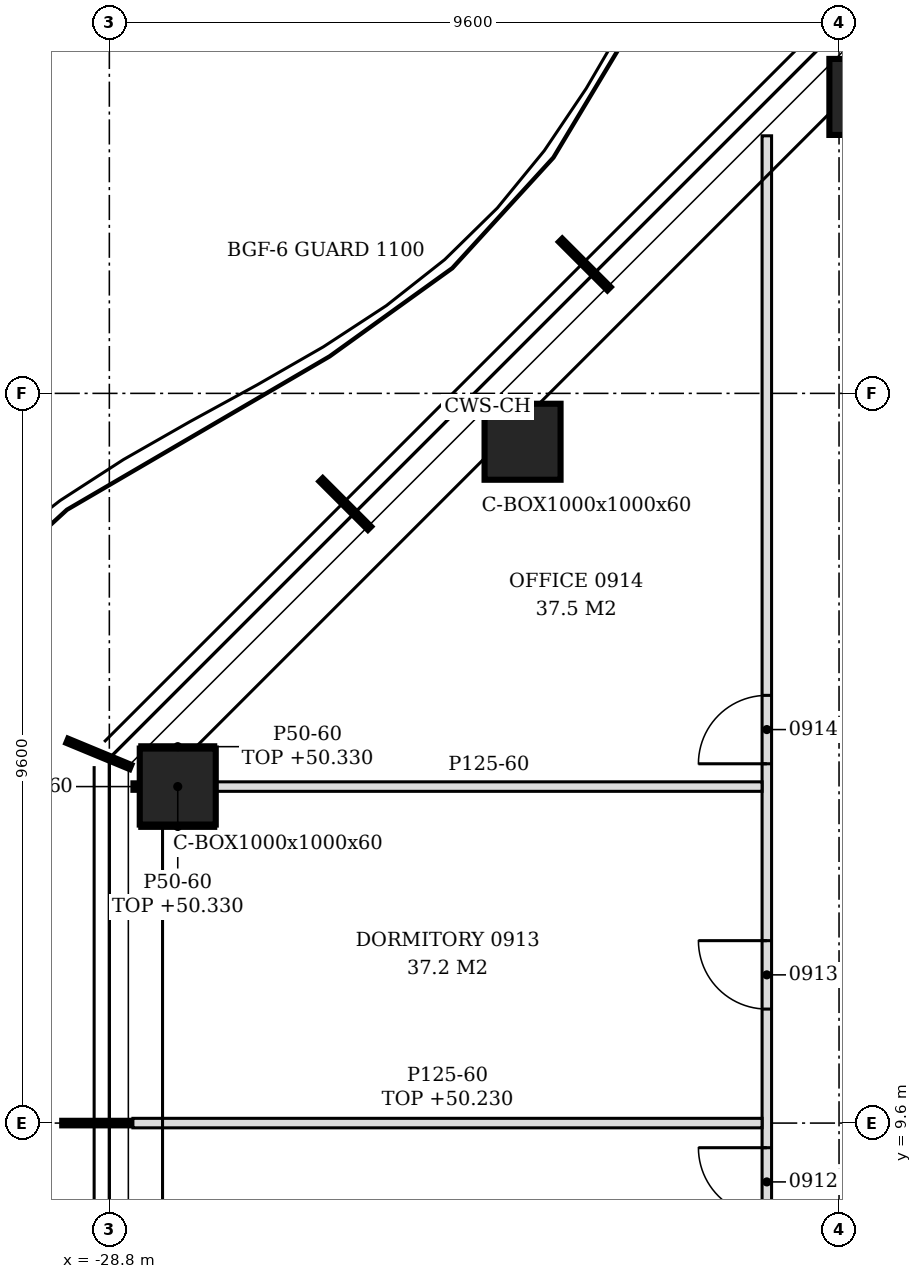
"""IFC4 building model, lengths in metres.
Left out: names, types, materials, properties, quantities, classifications, styles, units other than length and angle.
Written with IfcOpenShell. Run it as: python <this file> out.ifc"""

import sys

from ifc_helpers import new_model, si_unit, direction, frame, frame_2d, origin, origin_2d, place, context, subcontext, project, spatial, polyline, rectangle, hollow_rectangle, outline, extrude, element, fill, save


model = new_model("IFC4")
c1 = context("Model", 3, precision=1e-05, world=origin(), true_north=direction((0.0, 1.0)))
c2 = subcontext(c1, "Body", "Model", "MODEL_VIEW")
j1 = project(units=[si_unit("LENGTHUNIT", "METRE"), si_unit("PLANEANGLEUNIT", "RADIAN")], contexts=[c1])
p1 = place(None, origin())
s1 = spatial("IfcSite", under=j1, at=p1, CompositionType="ELEMENT")
p2 = place(p1, origin())
s2 = spatial("IfcBuilding", under=s1, at=p2, CompositionType="ELEMENT")
p3 = place(p2, frame((0.0, 0.0, 47.4)))
s3 = spatial("IfcBuildingStorey", under=s2, at=p3, CompositionType="ELEMENT", Elevation=47.4)
for number, where, z_axis, x_axis in (
    (1, (-18.827, 23.1, -0.15), (0.0, 0.0, 1.0), (1.0, 0.0, 0.0)),
    (2, (-23.364, 18.564, -0.15), (0.0, 0.0, 1.0), (1.0, 0.0, 0.0)),
    (3, (-27.9, 14.027, -0.15), (0.0, 0.0, 1.0), (1.0, 0.0, 0.0)),
):
    element("IfcColumn", number, at=place(p3, frame(where, z_axis=z_axis, x_axis=x_axis)), inside=s3, PredefinedType="COLUMN", context=c2, shape_type="SweptSolid", body=[
        extrude(hollow_rectangle(XDim=1.0, YDim=1.0, WallThickness=0.06, at=origin_2d()), origin(), (0.0, 0.0, 1.0), 3.6),
    ])
p4 = place(p3, frame((-20.15, -15.288, 0.0), z_axis=(0.0, 0.0, 1.0), x_axis=(0.0, 1.0, 0.0)))
e4 = element("IfcWall", 4, at=p4, inside=s3, PredefinedType="PARTITIONING", context=c2, shape_type="SweptSolid", body=[
    extrude(outline(polyline([(0.0, 0.0), (37.876, 0.0), (37.876, 3.45), (37.622, 3.45), (37.62, 2.63), (36.507, 2.63), (36.505, 3.45), (34.583, 3.45), (34.581, 2.98), (34.393, 2.98), (34.39, 3.45), (29.798, 3.45), (29.795, 2.83), (29.577, 2.83), (29.575, 3.45), (24.998, 3.45), (24.996, 2.83), (24.778, 2.83), (24.775, 3.45), (20.198, 3.45), (20.196, 2.83), (19.978, 2.83), (19.976, 3.45), (15.397, 3.45), (15.396, 2.83), (15.177, 2.83), (15.176, 3.45), (10.597, 3.45), (10.595, 2.83), (10.377, 2.83), (10.375, 3.45), (5.798, 3.45), (5.795, 2.83), (5.577, 2.83), (5.575, 3.45), (0.998, 3.45), (0.996, 2.83), (0.778, 2.83), (0.775, 3.45), (0.0, 3.45), (0.0, 0.0)])), frame((0.0, 0.062, 0.0), z_axis=(0.0, -1.0, 0.0), x_axis=(1.0, 0.0, 0.0)), (0.0, 0.0, 1.0), 0.125),
])
p5 = place(p4, frame((9.337, 0.0, 0.0)))
e5 = element("IfcOpeningElement", 5, at=p5, cuts=e4, PredefinedType="OPENING", context=c2, shape_type="SweptSolid", body=[
    extrude(rectangle(XDim=0.9, YDim=2.1, at=frame_2d((0.45, 1.05))), frame((0.0, 0.073, 0.0), z_axis=(0.0, -1.0, 0.0), x_axis=(1.0, 0.0, 0.0)), (0.0, 0.0, 1.0), 0.145),
])
p6 = place(p4, frame((10.912, 0.0, 0.0)))
e6 = element("IfcOpeningElement", 6, at=p6, cuts=e4, PredefinedType="OPENING", context=c2, shape_type="SweptSolid", body=[
    extrude(rectangle(XDim=0.9, YDim=2.1, at=frame_2d((0.45, 1.05))), frame((0.0, 0.073, 0.0), z_axis=(0.0, -1.0, 0.0), x_axis=(1.0, 0.0, 0.0)), (0.0, 0.0, 1.0), 0.145),
])
p7 = place(p4, frame((16.488, 0.0, 0.0)))
e7 = element("IfcOpeningElement", 7, at=p7, cuts=e4, PredefinedType="OPENING", context=c2, shape_type="SweptSolid", body=[
    extrude(rectangle(XDim=0.9, YDim=2.1, at=frame_2d((0.45, 1.05))), frame((0.0, 0.073, 0.0), z_axis=(0.0, -1.0, 0.0), x_axis=(1.0, 0.0, 0.0)), (0.0, 0.0, 1.0), 0.145),
])
p8 = place(p4, frame((23.664, 0.0, 0.0)))
e8 = element("IfcOpeningElement", 8, at=p8, cuts=e4, PredefinedType="OPENING", context=c2, shape_type="SweptSolid", body=[
    extrude(rectangle(XDim=0.9, YDim=2.1, at=frame_2d((0.45, 1.05))), frame((0.0, 0.073, 0.0), z_axis=(0.0, -1.0, 0.0), x_axis=(1.0, 0.0, 0.0)), (0.0, 0.0, 1.0), 0.145),
])
p9 = place(p4, frame((26.387, 0.0, 0.0)))
e9 = element("IfcOpeningElement", 9, at=p9, cuts=e4, PredefinedType="OPENING", context=c2, shape_type="SweptSolid", body=[
    extrude(rectangle(XDim=0.9, YDim=2.1, at=frame_2d((0.45, 1.05))), frame((0.0, 0.073, 0.0), z_axis=(0.0, -1.0, 0.0), x_axis=(1.0, 0.0, 0.0)), (0.0, 0.0, 1.0), 0.145),
])
p10 = place(p4, frame((29.615, 0.0, 0.0)))
e10 = element("IfcOpeningElement", 10, at=p10, cuts=e4, PredefinedType="OPENING", context=c2, shape_type="SweptSolid", body=[
    extrude(rectangle(XDim=0.9, YDim=2.1, at=frame_2d((0.45, 1.05))), frame((0.0, 0.073, 0.0), z_axis=(0.0, -1.0, 0.0), x_axis=(1.0, 0.0, 0.0)), (0.0, 0.0, 1.0), 0.145),
])
p11 = place(p3, frame((-28.49, 9.6, 0.0), z_axis=(0.0, 0.0, 1.0), x_axis=(1.0, 0.0, 0.0)))
e11 = element("IfcWall", 11, at=p11, inside=s3, PredefinedType="PARTITIONING", context=c2, shape_type="SweptSolid", body=[
    extrude(rectangle(XDim=8.278, YDim=0.125, at=frame_2d((4.139, 0.0))), origin(), (0.0, 0.0, 1.0), 2.83),
])
p12 = place(p3, frame((-28.503, 14.027, 0.0), z_axis=(0.0, 0.0, 1.0), x_axis=(1.0, 0.0, 0.0)))
e12 = element("IfcWall", 12, at=p12, inside=s3, PredefinedType="PARTITIONING", context=c2, shape_type="SweptSolid", body=[
    extrude(rectangle(XDim=0.103, YDim=0.125, at=frame_2d((0.052, 0.0))), origin(), (0.0, 0.0, 1.0), 3.45),
])
p13 = place(p3, frame((-27.4, 14.027, 0.0), z_axis=(0.0, 0.0, 1.0), x_axis=(1.0, 0.0, 0.0)))
e13 = element("IfcWall", 13, at=p13, inside=s3, PredefinedType="PARTITIONING", context=c2, shape_type="SweptSolid", body=[
    extrude(rectangle(XDim=7.188, YDim=0.125, at=frame_2d((3.594, 0.0))), origin(), (0.0, 0.0, 1.0), 3.45),
])
for number, where, z_axis, x_axis in (
    (14, (-28.4, 14.552, 0.0), (0.0, 0.0, 1.0), (1.0, 0.0, 0.0)),
    (15, (-28.4, 13.502, 0.0), (0.0, 0.0, 1.0), (1.0, 0.0, 0.0)),
):
    element("IfcWall", number, at=place(p3, frame(where, z_axis=z_axis, x_axis=x_axis)), inside=s3, PredefinedType="PARTITIONING", context=c2, shape_type="SweptSolid", body=[
        extrude(rectangle(XDim=1.0, YDim=0.05, at=frame_2d((0.5, 0.0))), origin(), (0.0, 0.0, 1.0), 2.93),
    ])
p14 = place(p8, origin())
e16 = element("IfcDoor", 16, at=p14, inside=s3, OperationType="SINGLE_SWING_RIGHT", PredefinedType="DOOR", context=c2, shape_type="SweptSolid", body=[
    extrude(rectangle(XDim=0.9, YDim=2.1, at=frame_2d((0.45, 1.05))), frame((0.0, 0.025, 0.0), z_axis=(0.0, -1.0, 0.0), x_axis=(1.0, 0.0, 0.0)), (0.0, 0.0, 1.0), 0.05),
])
fill(e8, e16)
p15 = place(p9, origin())
e17 = element("IfcDoor", 17, at=p15, inside=s3, OperationType="SINGLE_SWING_RIGHT", PredefinedType="DOOR", context=c2, shape_type="SweptSolid", body=[
    extrude(rectangle(XDim=0.9, YDim=2.1, at=frame_2d((0.45, 1.05))), frame((0.0, 0.025, 0.0), z_axis=(0.0, -1.0, 0.0), x_axis=(1.0, 0.0, 0.0)), (0.0, 0.0, 1.0), 0.05),
])
fill(e9, e17)
p16 = place(p10, origin())
e18 = element("IfcDoor", 18, at=p16, inside=s3, OperationType="SINGLE_SWING_LEFT", PredefinedType="DOOR", context=c2, shape_type="SweptSolid", body=[
    extrude(rectangle(XDim=0.9, YDim=2.1, at=frame_2d((0.45, 1.05))), frame((0.0, 0.025, 0.0), z_axis=(0.0, -1.0, 0.0), x_axis=(1.0, 0.0, 0.0)), (0.0, 0.0, 1.0), 0.05),
])
fill(e10, e18)
save(model, sys.argv[1])
